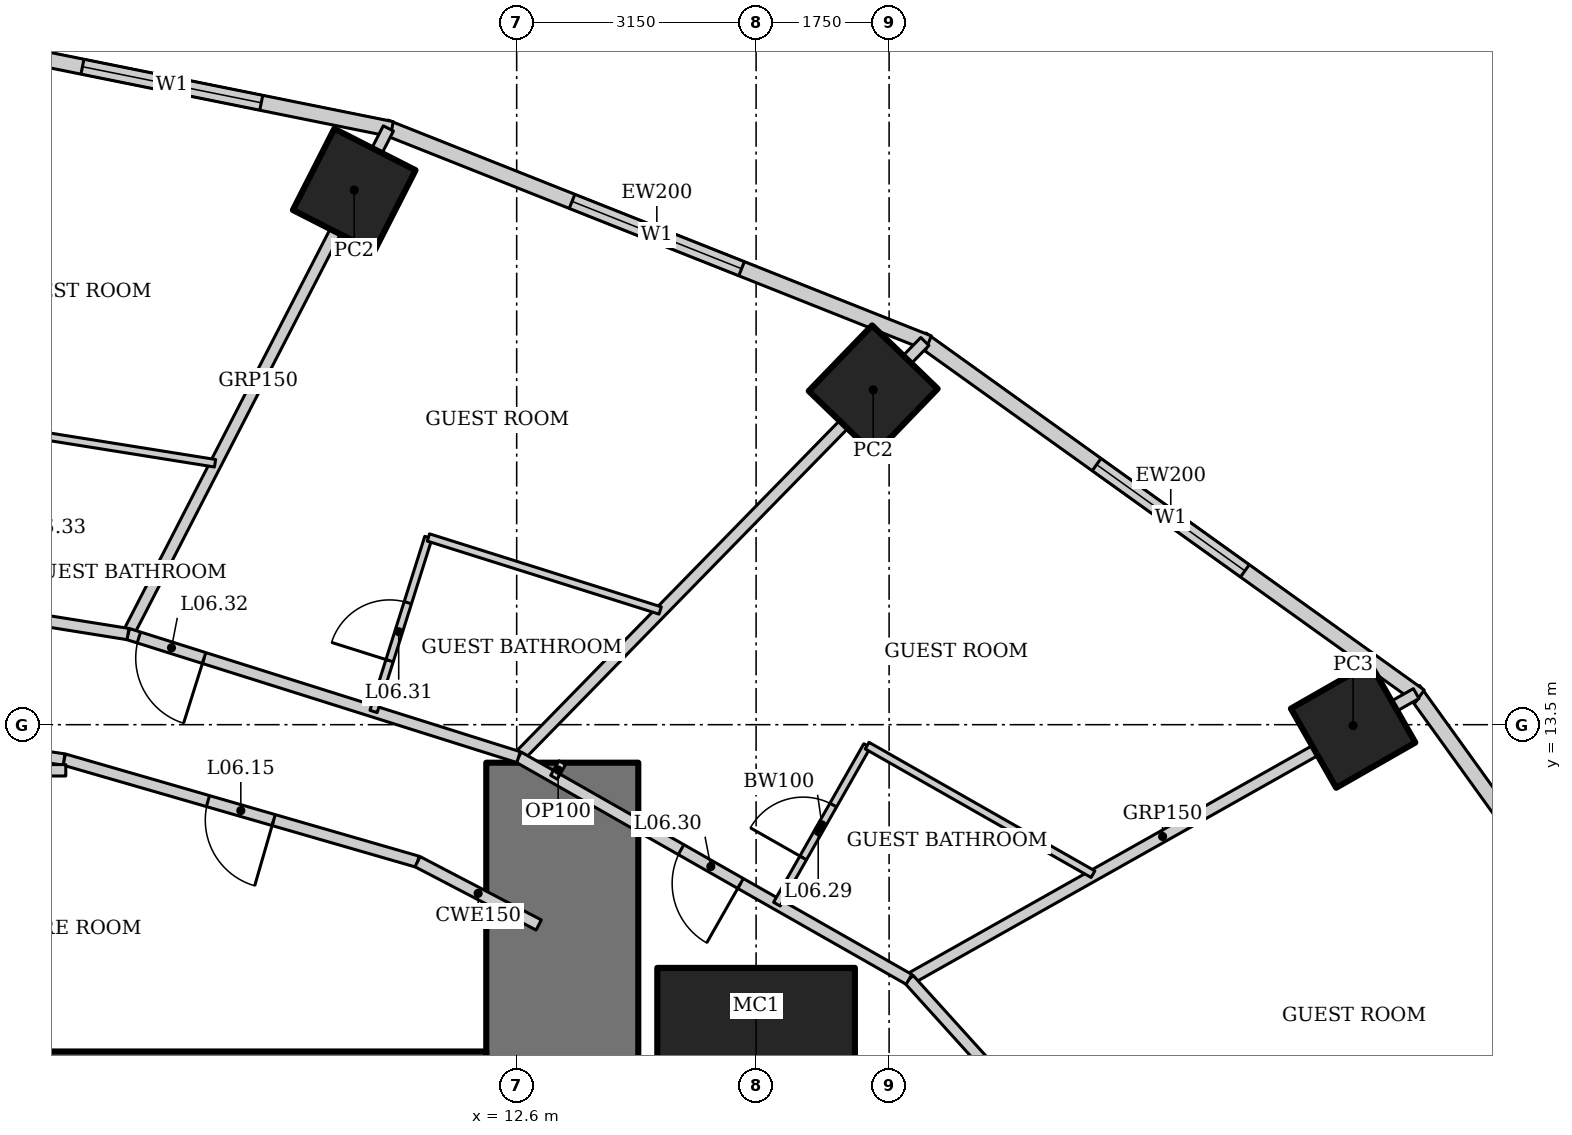
"""IFC4 building model, lengths in metres.
Left out: names, types, materials, properties, quantities, classifications, styles, units other than length and angle.
Written with IfcOpenShell. Run it as: python <this file> out.ifc"""

import sys

from ifc_helpers import new_model, si_unit, direction, frame, frame_2d, origin, origin_2d, place, context, subcontext, project, spatial, rectangle, hollow_rectangle, extrude, element, fill, save


model = new_model("IFC4")
c1 = context("Model", 3, precision=1e-05, world=origin(), true_north=direction((0.0, 1.0)))
c2 = subcontext(c1, "Body", "Model", "MODEL_VIEW")
j1 = project(units=[si_unit("LENGTHUNIT", "METRE"), si_unit("PLANEANGLEUNIT", "RADIAN")], contexts=[c1])
p1 = place(None, origin())
s1 = spatial("IfcSite", under=j1, at=p1, CompositionType="ELEMENT")
p2 = place(p1, origin())
s2 = spatial("IfcBuilding", under=s1, at=p2, CompositionType="ELEMENT")
p3 = place(p2, frame((0.0, 0.0, 37.0)))
s3 = spatial("IfcBuildingStorey", under=s2, at=p3, CompositionType="ELEMENT", Elevation=37.0)
p4 = place(p3, frame((15.75, 9.0, 0.0), z_axis=(0.0, 0.0, 1.0), x_axis=(1.0, 0.0, 0.0)))
e1 = element("IfcColumn", 1, at=p4, inside=s3, PredefinedType="COLUMN", context=c2, shape_type="SweptSolid", body=[
    extrude(hollow_rectangle(XDim=2.6, YDim=2.6, WallThickness=0.13, at=origin_2d()), origin(), (0.0, 0.0, 1.0), 3.6),
])
p5 = place(p3, frame((23.605, 13.489, 0.0), z_axis=(0.0, 0.0, 1.0), x_axis=(0.86824298017, 0.496139221777, 0.0)))
e2 = element("IfcColumn", 2, at=p5, inside=s3, PredefinedType="COLUMN", context=c2, shape_type="SweptSolid", body=[
    extrude(hollow_rectangle(XDim=1.2, YDim=1.2, WallThickness=0.12, at=origin_2d()), origin(), (0.0, 0.0, 1.0), 3.6),
])
for number, where, z_axis, x_axis in (
    (3, (17.291, 17.905, 0.0), (0.0, 0.0, 1.0), (0.695, 0.719, 0.0)),
    (4, (10.463, 20.534, 0.0), (0.0, 0.0, 1.0), (0.454, 0.891, 0.0)),
):
    element("IfcColumn", number, at=place(p3, frame(where, z_axis=z_axis, x_axis=x_axis)), inside=s3, PredefinedType="COLUMN", context=c2, shape_type="SweptSolid", body=[
        extrude(hollow_rectangle(XDim=1.2, YDim=1.2, WallThickness=0.1, at=origin_2d()), origin(), (0.0, 0.0, 1.0), 3.6),
    ])
p6 = place(p3, frame((13.2, -13.0, 0.0), z_axis=(0.0, 0.0, 1.0), x_axis=(0.0, 1.0, 0.0)))
e5 = element("IfcWall", 5, at=p6, inside=s3, PredefinedType="SHEAR", context=c2, shape_type="SweptSolid", body=[
    extrude(rectangle(XDim=26.0, YDim=2.0, at=frame_2d((13.0, 0.0))), origin(), (0.0, 0.0, 1.0), 3.6),
])
p7 = place(p6, frame((12.1, 0.0, 0.0)))
e6 = element("IfcOpeningElement", 6, at=p7, cuts=e5, PredefinedType="OPENING", context=c2, shape_type="SweptSolid", body=[
    extrude(rectangle(XDim=1.8, YDim=2.1, at=frame_2d((0.9, 1.05))), frame((0.0, 1.01, 0.0), z_axis=(0.0, -1.0, 0.0), x_axis=(1.0, 0.0, 0.0)), (0.0, 0.0, 1.0), 2.02),
])
p8 = place(p3, frame((12.2, 8.0, 0.0), z_axis=(0.0, 0.0, 1.0), x_axis=(-1.0, 0.0, 0.0)))
e7 = element("IfcWall", 7, at=p8, inside=s3, PredefinedType="SHEAR", context=c2, shape_type="SweptSolid", body=[
    extrude(rectangle(XDim=24.4, YDim=2.4, at=frame_2d((12.2, 0.0))), origin(), (0.0, 0.0, 1.0), 3.6),
])
p9 = place(p3, frame((29.26, 7.2, 0.0), z_axis=(0.0, 0.0, 1.0), x_axis=(-0.583937613703, 0.811798536155, 0.0)))
e8 = element("IfcWall", 8, at=p9, inside=s3, PredefinedType="SOLIDWALL", context=c2, shape_type="SweptSolid", body=[
    extrude(rectangle(XDim=8.323, YDim=0.2, at=frame_2d((4.162, 0.0))), origin(), (0.0, 0.0, 1.0), 3.45),
])
p10 = place(p9, frame((2.961, 0.0, 0.5)))
e9 = element("IfcOpeningElement", 9, at=p10, cuts=e8, PredefinedType="OPENING", context=c2, shape_type="SweptSolid", body=[
    extrude(rectangle(XDim=2.4, YDim=2.2, at=frame_2d((1.2, 1.1))), frame((0.0, 0.11, 0.0), z_axis=(0.0, -1.0, 0.0), x_axis=(1.0, 0.0, 0.0)), (0.0, 0.0, 1.0), 0.22),
])
p11 = place(p3, frame((24.482, 13.875, 0.0), z_axis=(0.0, 0.0, 1.0), x_axis=(-0.812791321576, 0.582554948112, 0.0)))
e10 = element("IfcWall", 10, at=p11, inside=s3, PredefinedType="SOLIDWALL", context=c2, shape_type="SweptSolid", body=[
    extrude(rectangle(XDim=8.063, YDim=0.2, at=frame_2d((4.032, 0.0))), origin(), (0.0, 0.0, 1.0), 3.45),
])
p12 = place(p11, frame((2.832, 0.0, 0.5)))
e11 = element("IfcOpeningElement", 11, at=p12, cuts=e10, PredefinedType="OPENING", context=c2, shape_type="SweptSolid", body=[
    extrude(rectangle(XDim=2.4, YDim=2.2, at=frame_2d((1.2, 1.1))), frame((0.0, 0.11, 0.0), z_axis=(0.0, -1.0, 0.0), x_axis=(1.0, 0.0, 0.0)), (0.0, 0.0, 1.0), 0.22),
])
p13 = place(p3, frame((18.018, 18.523, 0.0), z_axis=(0.0, 0.0, 1.0), x_axis=(-0.929358351251, 0.369178892895, 0.0)))
e12 = element("IfcWall", 12, at=p13, inside=s3, PredefinedType="SOLIDWALL", context=c2, shape_type="SweptSolid", body=[
    extrude(rectangle(XDim=7.692, YDim=0.2, at=frame_2d((3.846, 0.0))), origin(), (0.0, 0.0, 1.0), 3.45),
])
p14 = place(p13, frame((2.646, 0.0, 0.5)))
e13 = element("IfcOpeningElement", 13, at=p14, cuts=e12, PredefinedType="OPENING", context=c2, shape_type="SweptSolid", body=[
    extrude(rectangle(XDim=2.4, YDim=2.2, at=frame_2d((1.2, 1.1))), frame((0.0, 0.11, 0.0), z_axis=(0.0, -1.0, 0.0), x_axis=(1.0, 0.0, 0.0)), (0.0, 0.0, 1.0), 0.22),
])
p15 = place(p3, frame((10.957, 21.337, 0.0), z_axis=(0.0, 0.0, 1.0), x_axis=(-0.980251657452, 0.197754110105, 0.0)))
e14 = element("IfcWall", 14, at=p15, inside=s3, PredefinedType="SOLIDWALL", context=c2, shape_type="SweptSolid", body=[
    extrude(rectangle(XDim=5.904, YDim=0.2, at=frame_2d((2.952, 0.0))), origin(), (0.0, 0.0, 1.0), 3.45),
])
p16 = place(p15, frame((1.752, 0.0, 0.5)))
e15 = element("IfcOpeningElement", 15, at=p16, cuts=e14, PredefinedType="OPENING", context=c2, shape_type="SweptSolid", body=[
    extrude(rectangle(XDim=2.4, YDim=2.2, at=frame_2d((1.2, 1.1))), frame((0.0, 0.11, 0.0), z_axis=(0.0, -1.0, 0.0), x_axis=(1.0, 0.0, 0.0)), (0.0, 0.0, 1.0), 0.22),
])
p17 = place(p3, frame((24.435, 13.909, 0.0), z_axis=(0.0, 0.0, 1.0), x_axis=(-0.871267209855, -0.490808974074, 0.0)))
e16 = element("IfcWall", 16, at=p17, inside=s3, PredefinedType="PARTITIONING", context=c2, shape_type="SweptSolid", body=[
    extrude(rectangle(XDim=7.659, YDim=0.15, at=frame_2d((3.83, 0.0))), origin(), (0.0, 0.0, 1.0), 2.693),
])
p18 = place(p3, frame((17.97, 18.542, 0.0), z_axis=(0.0, 0.0, 1.0), x_axis=(-0.699032031211, -0.715090357467, 0.0)))
e17 = element("IfcWall", 17, at=p18, inside=s3, PredefinedType="PARTITIONING", context=c2, shape_type="SweptSolid", body=[
    extrude(rectangle(XDim=7.647, YDim=0.15, at=frame_2d((3.824, 0.0))), origin(), (0.0, 0.0, 1.0), 2.528),
])
p19 = place(p3, frame((10.912, 21.346, 0.0), z_axis=(0.0, 0.0, 1.0), x_axis=(-0.45777845119, -0.889066302154, 0.0)))
e18 = element("IfcWall", 18, at=p19, inside=s3, PredefinedType="PARTITIONING", context=c2, shape_type="SweptSolid", body=[
    extrude(rectangle(XDim=7.483, YDim=0.15, at=frame_2d((3.742, 0.0))), origin(), (0.0, 0.0, 1.0), 2.528),
])
p20 = place(p3, frame((21.982, 5.481, 0.0), z_axis=(0.0, 0.0, 1.0), x_axis=(-0.670598380282, 0.741820606591, 0.0)))
e19 = element("IfcWall", 19, at=p20, inside=s3, PredefinedType="PARTITIONING", context=c2, shape_type="SweptSolid", body=[
    extrude(rectangle(XDim=6.293, YDim=0.15, at=frame_2d((3.147, 0.0))), origin(), (0.0, 0.0, 1.0), 3.45),
])
p21 = place(p20, frame((2.1, 0.0, 0.0)))
e20 = element("IfcOpeningElement", 20, at=p21, cuts=e19, PredefinedType="OPENING", context=c2, shape_type="SweptSolid", body=[
    extrude(rectangle(XDim=0.9, YDim=2.1, at=frame_2d((0.45, 1.05))), frame((0.0, 0.085, 0.0), z_axis=(0.0, -1.0, 0.0), x_axis=(1.0, 0.0, 0.0)), (0.0, 0.0, 1.0), 0.17),
])
p22 = place(p3, frame((17.761, 10.149, 0.0), z_axis=(0.0, 0.0, 1.0), x_axis=(-0.86907565943, 0.494679187136, 0.0)))
e21 = element("IfcWall", 21, at=p22, inside=s3, PredefinedType="PARTITIONING", context=c2, shape_type="SweptSolid", body=[
    extrude(rectangle(XDim=5.911, YDim=0.15, at=frame_2d((2.955, 0.0))), origin(), (0.0, 0.0, 1.0), 3.45),
])
p23 = place(p22, frame((2.55, 0.0, 0.0)))
e22 = element("IfcOpeningElement", 22, at=p23, cuts=e21, PredefinedType="OPENING", context=c2, shape_type="SweptSolid", body=[
    extrude(rectangle(XDim=0.9, YDim=2.1, at=frame_2d((0.45, 1.05))), frame((0.0, 0.085, 0.0), z_axis=(0.0, -1.0, 0.0), x_axis=(1.0, 0.0, 0.0)), (0.0, 0.0, 1.0), 0.17),
])
p24 = place(p3, frame((12.625, 13.073, 0.0), z_axis=(0.0, 0.0, 1.0), x_axis=(-0.953774229808, 0.30052407317, 0.0)))
e23 = element("IfcWall", 23, at=p24, inside=s3, PredefinedType="PARTITIONING", context=c2, shape_type="SweptSolid", body=[
    extrude(rectangle(XDim=5.388, YDim=0.15, at=frame_2d((2.694, 0.0))), origin(), (0.0, 0.0, 1.0), 3.45),
])
p25 = place(p24, frame((4.338, 0.0, 0.0)))
e24 = element("IfcOpeningElement", 24, at=p25, cuts=e23, PredefinedType="OPENING", context=c2, shape_type="SweptSolid", body=[
    extrude(rectangle(XDim=0.9, YDim=2.1, at=frame_2d((0.45, 1.05))), frame((0.0, 0.085, 0.0), z_axis=(0.0, -1.0, 0.0), x_axis=(1.0, 0.0, 0.0)), (0.0, 0.0, 1.0), 0.17),
])
p26 = place(p3, frame((7.486, 14.692, 0.0), z_axis=(0.0, 0.0, 1.0), x_axis=(-0.987475660646, 0.157771415761, 0.0)))
e25 = element("IfcWall", 25, at=p26, inside=s3, PredefinedType="PARTITIONING", context=c2, shape_type="SweptSolid", body=[
    extrude(rectangle(XDim=3.999, YDim=0.15, at=frame_2d((1.999, 0.0))), origin(), (0.0, 0.0, 1.0), 3.45),
])
p27 = place(p26, frame((2.1, 0.0, 0.0)))
e26 = element("IfcOpeningElement", 26, at=p27, cuts=e25, PredefinedType="OPENING", context=c2, shape_type="SweptSolid", body=[
    extrude(rectangle(XDim=0.9, YDim=2.1, at=frame_2d((0.45, 1.05))), frame((0.0, 0.085, 0.0), z_axis=(0.0, -1.0, 0.0), x_axis=(1.0, 0.0, 0.0)), (0.0, 0.0, 1.0), 0.17),
])
p28 = place(p3, frame((11.296, 11.698, 0.0), z_axis=(0.0, 0.0, 1.0), x_axis=(-0.960678318068, 0.277663770041, 0.0)))
e27 = element("IfcWall", 27, at=p28, inside=s3, PredefinedType="PARTITIONING", context=c2, shape_type="SweptSolid", body=[
    extrude(rectangle(XDim=4.841, YDim=0.15, at=frame_2d((2.421, 0.0))), origin(), (0.0, 0.0, 1.0), 3.45),
])
p29 = place(p28, frame((1.971, 0.0, 0.0)))
e28 = element("IfcOpeningElement", 28, at=p29, cuts=e27, PredefinedType="OPENING", context=c2, shape_type="SweptSolid", body=[
    extrude(rectangle(XDim=0.9, YDim=2.1, at=frame_2d((0.45, 1.05))), frame((0.0, 0.085, 0.0), z_axis=(0.0, -1.0, 0.0), x_axis=(1.0, 0.0, 0.0)), (0.0, 0.0, 1.0), 0.17),
])
p30 = place(p3, frame((6.645, 13.042, 0.0), z_axis=(0.0, 0.0, 1.0), x_axis=(-0.989443047021, 0.14492224364, 0.0)))
e29 = element("IfcWall", 29, at=p30, inside=s3, PredefinedType="PARTITIONING", context=c2, shape_type="SweptSolid", body=[
    extrude(rectangle(XDim=3.553, YDim=0.15, at=frame_2d((1.776, 0.0))), origin(), (0.0, 0.0, 1.0), 3.45),
])
p31 = place(p3, frame((16.023, 11.139, 0.0), z_axis=(0.0, 0.0, 1.0), x_axis=(0.494659381266, 0.869086932663, 0.0)))
e30 = element("IfcWall", 30, at=p31, inside=s3, PredefinedType="PARTITIONING", context=c2, shape_type="SweptSolid", body=[
    extrude(rectangle(XDim=2.4, YDim=0.1, at=frame_2d((1.2, 0.0))), origin(), (0.0, 0.0, 1.0), 3.45),
])
p32 = place(p31, frame((0.7, 0.0, 0.0)))
e31 = element("IfcOpeningElement", 31, at=p32, cuts=e30, PredefinedType="OPENING", context=c2, shape_type="SweptSolid", body=[
    extrude(rectangle(XDim=0.8, YDim=2.1, at=frame_2d((0.4, 1.05))), frame((0.0, 0.06, 0.0), z_axis=(0.0, -1.0, 0.0), x_axis=(1.0, 0.0, 0.0)), (0.0, 0.0, 1.0), 0.12),
])
p33 = place(p3, frame((17.21, 13.225, 0.0), z_axis=(0.0, 0.0, 1.0), x_axis=(0.869041592831, -0.494739032147, 0.0)))
e32 = element("IfcWall", 32, at=p33, inside=s3, PredefinedType="PARTITIONING", context=c2, shape_type="SweptSolid", body=[
    extrude(rectangle(XDim=3.42, YDim=0.1, at=frame_2d((1.71, 0.0))), origin(), (0.0, 0.0, 1.0), 3.45),
])
p34 = place(p3, frame((10.717, 13.674, 0.0), z_axis=(0.0, 0.0, 1.0), x_axis=(0.30049839721, 0.953782319649, 0.0)))
e33 = element("IfcWall", 33, at=p34, inside=s3, PredefinedType="PARTITIONING", context=c2, shape_type="SweptSolid", body=[
    extrude(rectangle(XDim=2.4, YDim=0.1, at=frame_2d((1.2, 0.0))), origin(), (0.0, 0.0, 1.0), 3.45),
])
p35 = place(p34, frame((0.7, 0.0, 0.0)))
e34 = element("IfcOpeningElement", 34, at=p35, cuts=e33, PredefinedType="OPENING", context=c2, shape_type="SweptSolid", body=[
    extrude(rectangle(XDim=0.8, YDim=2.1, at=frame_2d((0.4, 1.05))), frame((0.0, 0.06, 0.0), z_axis=(0.0, -1.0, 0.0), x_axis=(1.0, 0.0, 0.0)), (0.0, 0.0, 1.0), 0.12),
])
p36 = place(p3, frame((11.438, 15.963, 0.0), z_axis=(0.0, 0.0, 1.0), x_axis=(0.953784420519, -0.300491728963, 0.0)))
e35 = element("IfcWall", 35, at=p36, inside=s3, PredefinedType="PARTITIONING", context=c2, shape_type="SweptSolid", body=[
    extrude(rectangle(XDim=3.197, YDim=0.1, at=frame_2d((1.599, 0.0))), origin(), (0.0, 0.0, 1.0), 3.45),
])
p37 = place(p3, frame((5.89, 17.378, 0.0), z_axis=(0.0, 0.0, 1.0), x_axis=(0.987476824576, -0.15776413067, 0.0)))
e36 = element("IfcWall", 36, at=p37, inside=s3, PredefinedType="PARTITIONING", context=c2, shape_type="SweptSolid", body=[
    extrude(rectangle(XDim=2.776, YDim=0.1, at=frame_2d((1.388, 0.0))), origin(), (0.0, 0.0, 1.0), 3.45),
])
p38 = place(p3, frame((13.2, 13.0, 0.0), z_axis=(0.0, 0.0, 1.0), x_axis=(-0.49435138335, -0.869262164011, 0.0)))
e37 = element("IfcWall", 37, at=p38, inside=s3, PredefinedType="PARTITIONING", context=c2, shape_type="SweptSolid", body=[
    extrude(rectangle(XDim=0.221, YDim=0.1, at=frame_2d((0.11, 0.0))), origin(), (0.0, 0.0, 1.0), 3.45),
])
p39 = place(p3, frame((6.668, 12.9, 0.0), z_axis=(0.0, 0.0, 1.0), x_axis=(-1.0, 0.0, 0.0)))
e38 = element("IfcWall", 38, at=p39, inside=s3, PredefinedType="PARTITIONING", context=c2, shape_type="SweptSolid", body=[
    extrude(rectangle(XDim=4.633, YDim=0.15, at=frame_2d((2.316, 0.0))), origin(), (0.0, 0.0, 1.0), 3.45),
])
p40 = place(p3, frame((12.89, 10.865, 0.0), z_axis=(0.0, 0.0, 1.0), x_axis=(-0.886301440762, 0.463108795104, 0.0)))
e39 = element("IfcWall", 39, at=p40, inside=s3, PredefinedType="PARTITIONING", context=c2, shape_type="SweptSolid", body=[
    extrude(rectangle(XDim=1.798, YDim=0.15, at=frame_2d((0.899, 0.0))), origin(), (0.0, 0.0, 1.0), 3.45),
])
p41 = place(p12, origin())
e40 = element("IfcWindow", 40, at=p41, inside=s3, PartitioningType="SINGLE_PANEL", PredefinedType="WINDOW", context=c2, shape_type="SweptSolid", body=[
    extrude(rectangle(XDim=2.4, YDim=2.2, at=frame_2d((1.2, 1.1))), frame((0.0, 0.03, 0.0), z_axis=(0.0, -1.0, 0.0), x_axis=(1.0, 0.0, 0.0)), (0.0, 0.0, 1.0), 0.06),
])
fill(e11, e40)
p42 = place(p14, origin())
e41 = element("IfcWindow", 41, at=p42, inside=s3, PartitioningType="SINGLE_PANEL", PredefinedType="WINDOW", context=c2, shape_type="SweptSolid", body=[
    extrude(rectangle(XDim=2.4, YDim=2.2, at=frame_2d((1.2, 1.1))), frame((0.0, 0.03, 0.0), z_axis=(0.0, -1.0, 0.0), x_axis=(1.0, 0.0, 0.0)), (0.0, 0.0, 1.0), 0.06),
])
fill(e13, e41)
p43 = place(p16, origin())
e42 = element("IfcWindow", 42, at=p43, inside=s3, PartitioningType="SINGLE_PANEL", PredefinedType="WINDOW", context=c2, shape_type="SweptSolid", body=[
    extrude(rectangle(XDim=2.4, YDim=2.2, at=frame_2d((1.2, 1.1))), frame((0.0, 0.03, 0.0), z_axis=(0.0, -1.0, 0.0), x_axis=(1.0, 0.0, 0.0)), (0.0, 0.0, 1.0), 0.06),
])
fill(e15, e42)
p44 = place(p29, origin())
e43 = element("IfcDoor", 43, at=p44, inside=s3, OperationType="SINGLE_SWING_LEFT", PredefinedType="DOOR", context=c2, shape_type="SweptSolid", body=[
    extrude(rectangle(XDim=0.9, YDim=2.1, at=frame_2d((0.45, 1.05))), frame((0.0, 0.025, 0.0), z_axis=(0.0, -1.0, 0.0), x_axis=(1.0, 0.0, 0.0)), (0.0, 0.0, 1.0), 0.05),
])
fill(e28, e43)
p45 = place(p32, origin())
e44 = element("IfcDoor", 44, at=p45, inside=s3, OperationType="SINGLE_SWING_LEFT", PredefinedType="DOOR", context=c2, shape_type="SweptSolid", body=[
    extrude(rectangle(XDim=0.8, YDim=2.1, at=frame_2d((0.4, 1.05))), frame((0.0, 0.025, 0.0), z_axis=(0.0, -1.0, 0.0), x_axis=(1.0, 0.0, 0.0)), (0.0, 0.0, 1.0), 0.05),
])
fill(e31, e44)
p46 = place(p23, origin())
e45 = element("IfcDoor", 45, at=p46, inside=s3, OperationType="SINGLE_SWING_LEFT", PredefinedType="DOOR", context=c2, shape_type="SweptSolid", body=[
    extrude(rectangle(XDim=0.9, YDim=2.1, at=frame_2d((0.45, 1.05))), frame((0.0, 0.025, 0.0), z_axis=(0.0, -1.0, 0.0), x_axis=(1.0, 0.0, 0.0)), (0.0, 0.0, 1.0), 0.05),
])
fill(e22, e45)
p47 = place(p35, origin())
e46 = element("IfcDoor", 46, at=p47, inside=s3, OperationType="SINGLE_SWING_LEFT", PredefinedType="DOOR", context=c2, shape_type="SweptSolid", body=[
    extrude(rectangle(XDim=0.8, YDim=2.1, at=frame_2d((0.4, 1.05))), frame((0.0, 0.025, 0.0), z_axis=(0.0, -1.0, 0.0), x_axis=(1.0, 0.0, 0.0)), (0.0, 0.0, 1.0), 0.05),
])
fill(e34, e46)
p48 = place(p25, origin())
e47 = element("IfcDoor", 47, at=p48, inside=s3, OperationType="SINGLE_SWING_LEFT", PredefinedType="DOOR", context=c2, shape_type="SweptSolid", body=[
    extrude(rectangle(XDim=0.9, YDim=2.1, at=frame_2d((0.45, 1.05))), frame((0.0, 0.025, 0.0), z_axis=(0.0, -1.0, 0.0), x_axis=(1.0, 0.0, 0.0)), (0.0, 0.0, 1.0), 0.05),
])
fill(e24, e47)
save(model, sys.argv[1])
